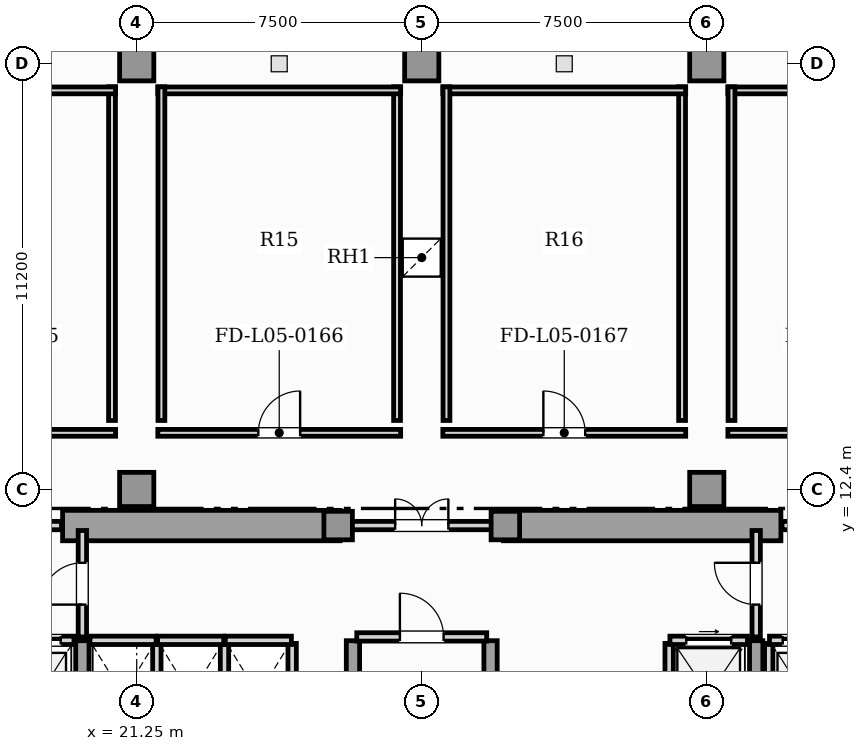
"""IFC4 building model, lengths in metres.
Left out: names, types, materials, properties, quantities, classifications, styles, units other than length and angle.
Written with IfcOpenShell. Run it as: python <this file> out.ifc"""

import sys

from ifc_helpers import new_model, si_unit, direction, frame, frame_2d, origin, origin_2d, place, context, subcontext, project, spatial, rectangle, extrude, element, fill, save


model = new_model("IFC4")
c1 = context("Model", 3, precision=1e-05, world=origin(), true_north=direction((0.0, 1.0)))
c2 = subcontext(c1, "Body", "Model", "MODEL_VIEW")
j1 = project(units=[si_unit("LENGTHUNIT", "METRE"), si_unit("PLANEANGLEUNIT", "RADIAN")], contexts=[c1])
p1 = place(None, origin())
s1 = spatial("IfcSite", under=j1, at=p1, CompositionType="ELEMENT")
p2 = place(p1, origin())
s2 = spatial("IfcBuilding", under=s1, at=p2, CompositionType="ELEMENT")
p3 = place(p2, frame((0.0, 0.0, 24.6)))
s3 = spatial("IfcBuildingStorey", under=s2, at=p3, CompositionType="ELEMENT", Elevation=24.6)
for number, where, z_axis, x_axis in (
    (1, (19.3, 11.45, 0.0), (0.0, 0.0, 1.0), (1.0, 0.0, 0.0)),
    (2, (30.9, 11.45, 0.0), (0.0, 0.0, 1.0), (1.0, 0.0, 0.0)),
):
    element("IfcWall", number, at=place(p3, frame(where, z_axis=z_axis, x_axis=x_axis)), inside=s3, PredefinedType="SHEAR", context=c2, shape_type="SweptSolid", body=[
        extrude(rectangle(XDim=7.3, YDim=0.8, at=frame_2d((3.65, 0.0))), origin(), (0.0, 0.0, 1.0), 4.95),
    ])
for number, where, z_axis, x_axis in (
    (3, (19.82, 0.92, 0.0), (0.0, 0.0, 1.0), (0.0, 1.0, 0.0)),
    (4, (26.94, 0.92, 0.0), (0.0, 0.0, 1.0), (0.0, 1.0, 0.0)),
    (5, (30.56, 0.92, 0.0), (0.0, 0.0, 1.0), (0.0, 1.0, 0.0)),
    (6, (37.55, 0.92, 0.0), (0.0, 0.0, 1.0), (0.0, 1.0, 0.0)),
):
    element("IfcWall", number, at=place(p3, frame(where, z_axis=z_axis, x_axis=x_axis)), inside=s3, PredefinedType="SHEAR", context=c2, shape_type="SweptSolid", body=[
        extrude(rectangle(XDim=7.5, YDim=0.35, at=frame_2d((3.75, 0.0))), origin(), (0.0, 0.0, 1.0), 4.95),
    ])
for number, where, z_axis, x_axis in (
    (7, (26.55, 11.45, 0.0), (0.0, 0.0, 1.0), (1.0, 0.0, 0.0)),
    (8, (30.95, 11.45, 0.0), (0.0, 0.0, 1.0), (1.0, 0.0, 0.0)),
):
    element("IfcColumn", number, at=place(p3, frame(where, z_axis=z_axis, x_axis=x_axis)), inside=s3, PredefinedType="COLUMN", context=c2, shape_type="SweptSolid", body=[
        extrude(rectangle(XDim=0.75, YDim=0.75, at=origin_2d()), origin(), (0.0, 0.0, 1.0), 5.2),
    ])
for number, where, z_axis, x_axis in (
    (9, (28.75, 23.6, 0.0), (0.0, 0.0, 1.0), (1.0, 0.0, 0.0)),
    (10, (21.25, 12.4, 0.0), (0.0, 0.0, 1.0), (1.0, 0.0, 0.0)),
    (11, (36.25, 12.4, 0.0), (0.0, 0.0, 1.0), (1.0, 0.0, 0.0)),
    (12, (21.25, 23.6, 0.0), (0.0, 0.0, 1.0), (1.0, 0.0, 0.0)),
    (13, (36.25, 23.6, 0.0), (0.0, 0.0, 1.0), (1.0, 0.0, 0.0)),
):
    element("IfcColumn", number, at=place(p3, frame(where, z_axis=z_axis, x_axis=x_axis)), inside=s3, PredefinedType="COLUMN", context=c2, shape_type="SweptSolid", body=[
        extrude(rectangle(XDim=0.9, YDim=0.9, at=origin_2d()), origin(), (0.0, 0.0, 1.0), 5.2),
    ])
p4 = place(p3, frame((17.78, 8.43, 0.0), z_axis=(0.0, 0.0, 1.0), x_axis=(1.0, 0.0, 0.0)))
e14 = element("IfcWall", 14, at=p4, inside=s3, PredefinedType="SOLIDWALL", context=c2, shape_type="SweptSolid", body=[
    extrude(rectangle(XDim=1.82, YDim=0.22, at=frame_2d((0.91, 0.0))), origin(), (0.0, 0.0, 1.0), 4.95),
])
p5 = place(p4, frame((0.35, 0.0, 0.0)))
e15 = element("IfcOpeningElement", 15, at=p5, cuts=e14, PredefinedType="OPENING", context=c2, shape_type="SweptSolid", body=[
    extrude(rectangle(XDim=1.12, YDim=2.25, at=frame_2d((0.56, 1.125))), frame((0.0, 0.12, 0.0), z_axis=(0.0, -1.0, 0.0), x_axis=(1.0, 0.0, 0.0)), (0.0, 0.0, 1.0), 0.24),
])
p6 = place(p3, frame((37.88, 5.65, 0.0), z_axis=(0.0, 0.0, 1.0), x_axis=(0.0, 1.0, 0.0)))
e16 = element("IfcWall", 16, at=p6, inside=s3, PredefinedType="SOLIDWALL", context=c2, shape_type="SweptSolid", body=[
    extrude(rectangle(XDim=2.7, YDim=0.22, at=frame_2d((1.35, 0.0))), origin(), (0.0, 0.0, 1.0), 4.95),
])
p7 = place(p3, frame((37.9, 8.43, 0.0), z_axis=(0.0, 0.0, 1.0), x_axis=(1.0, 0.0, 0.0)))
e17 = element("IfcWall", 17, at=p7, inside=s3, PredefinedType="SOLIDWALL", context=c2, shape_type="SweptSolid", body=[
    extrude(rectangle(XDim=1.82, YDim=0.22, at=frame_2d((0.91, 0.0))), origin(), (0.0, 0.0, 1.0), 4.95),
])
p8 = place(p7, frame((0.35, 0.0, 0.0)))
e18 = element("IfcOpeningElement", 18, at=p8, cuts=e17, PredefinedType="OPENING", context=c2, shape_type="SweptSolid", body=[
    extrude(rectangle(XDim=1.12, YDim=2.25, at=frame_2d((0.56, 1.125))), frame((0.0, 0.12, 0.0), z_axis=(0.0, -1.0, 0.0), x_axis=(1.0, 0.0, 0.0)), (0.0, 0.0, 1.0), 0.24),
])
p9 = place(p3, frame((35.26, 5.65, 0.0), z_axis=(0.0, 0.0, 1.0), x_axis=(0.0, 1.0, 0.0)))
e19 = element("IfcWall", 19, at=p9, inside=s3, PredefinedType="SOLIDWALL", context=c2, shape_type="SweptSolid", body=[
    extrude(rectangle(XDim=2.7, YDim=0.22, at=frame_2d((1.35, 0.0))), origin(), (0.0, 0.0, 1.0), 4.95),
])
p10 = place(p3, frame((35.28, 8.43, 0.0), z_axis=(0.0, 0.0, 1.0), x_axis=(1.0, 0.0, 0.0)))
e20 = element("IfcWall", 20, at=p10, inside=s3, PredefinedType="SOLIDWALL", context=c2, shape_type="SweptSolid", body=[
    extrude(rectangle(XDim=2.04, YDim=0.22, at=frame_2d((1.02, 0.0))), origin(), (0.0, 0.0, 1.0), 4.95),
])
p11 = place(p10, frame((0.43, 0.0, 0.0)))
e21 = element("IfcOpeningElement", 21, at=p11, cuts=e20, PredefinedType="OPENING", context=c2, shape_type="SweptSolid", body=[
    extrude(rectangle(XDim=1.18, YDim=2.2, at=frame_2d((0.59, 1.1))), frame((0.0, 0.12, 0.0), z_axis=(0.0, -1.0, 0.0), x_axis=(1.0, 0.0, 0.0)), (0.0, 0.0, 1.0), 0.24),
])
p12 = place(p3, frame((21.78, 5.65, 0.0), z_axis=(0.0, 0.0, 1.0), x_axis=(0.0, 1.0, 0.0)))
e22 = element("IfcWall", 22, at=p12, inside=s3, PredefinedType="SOLIDWALL", context=c2, shape_type="SweptSolid", body=[
    extrude(rectangle(XDim=2.7, YDim=0.22, at=frame_2d((1.35, 0.0))), origin(), (0.0, 0.0, 1.0), 4.95),
])
p13 = place(p3, frame((20.02, 8.43, 0.0), z_axis=(0.0, 0.0, 1.0), x_axis=(1.0, 0.0, 0.0)))
e23 = element("IfcWall", 23, at=p13, inside=s3, PredefinedType="SOLIDWALL", context=c2, shape_type="SweptSolid", body=[
    extrude(rectangle(XDim=1.74, YDim=0.22, at=frame_2d((0.87, 0.0))), origin(), (0.0, 0.0, 1.0), 4.95),
])
p14 = place(p3, frame((23.56, 5.65, 0.0), z_axis=(0.0, 0.0, 1.0), x_axis=(0.0, 1.0, 0.0)))
e24 = element("IfcWall", 24, at=p14, inside=s3, PredefinedType="SOLIDWALL", context=c2, shape_type="SweptSolid", body=[
    extrude(rectangle(XDim=2.7, YDim=0.22, at=frame_2d((1.35, 0.0))), origin(), (0.0, 0.0, 1.0), 4.95),
])
p15 = place(p3, frame((21.8, 8.43, 0.0), z_axis=(0.0, 0.0, 1.0), x_axis=(1.0, 0.0, 0.0)))
e25 = element("IfcWall", 25, at=p15, inside=s3, PredefinedType="SOLIDWALL", context=c2, shape_type="SweptSolid", body=[
    extrude(rectangle(XDim=1.74, YDim=0.22, at=frame_2d((0.87, 0.0))), origin(), (0.0, 0.0, 1.0), 4.95),
])
p16 = place(p3, frame((25.34, 5.65, 0.0), z_axis=(0.0, 0.0, 1.0), x_axis=(0.0, 1.0, 0.0)))
e26 = element("IfcWall", 26, at=p16, inside=s3, PredefinedType="SOLIDWALL", context=c2, shape_type="SweptSolid", body=[
    extrude(rectangle(XDim=2.7, YDim=0.22, at=frame_2d((1.35, 0.0))), origin(), (0.0, 0.0, 1.0), 4.95),
])
p17 = place(p3, frame((23.58, 8.43, 0.0), z_axis=(0.0, 0.0, 1.0), x_axis=(1.0, 0.0, 0.0)))
e27 = element("IfcWall", 27, at=p17, inside=s3, PredefinedType="SOLIDWALL", context=c2, shape_type="SweptSolid", body=[
    extrude(rectangle(XDim=1.74, YDim=0.22, at=frame_2d((0.87, 0.0))), origin(), (0.0, 0.0, 1.0), 4.95),
])
p18 = place(p3, frame((27.04, 8.52, 0.0), z_axis=(0.0, 0.0, 1.0), x_axis=(1.0, 0.0, 0.0)))
e28 = element("IfcWall", 28, at=p18, inside=s3, PredefinedType="SOLIDWALL", context=c2, shape_type="SweptSolid", body=[
    extrude(rectangle(XDim=3.42, YDim=0.22, at=frame_2d((1.71, 0.0))), origin(), (0.0, 0.0, 1.0), 4.95),
])
p19 = place(p18, frame((1.135, 0.0, 0.0)))
e29 = element("IfcOpeningElement", 29, at=p19, cuts=e28, PredefinedType="OPENING", context=c2, shape_type="SweptSolid", body=[
    extrude(rectangle(XDim=1.15, YDim=2.2, at=frame_2d((0.575, 1.1))), frame((0.0, 0.12, 0.0), z_axis=(0.0, -1.0, 0.0), x_axis=(1.0, 0.0, 0.0)), (0.0, 0.0, 1.0), 0.24),
])
p20 = place(p3, frame((19.82, 8.52, 0.0), z_axis=(0.0, 0.0, 1.0), x_axis=(0.0, 1.0, 0.0)))
e30 = element("IfcWall", 30, at=p20, inside=s3, PredefinedType="SOLIDWALL", context=c2, shape_type="SweptSolid", body=[
    extrude(rectangle(XDim=2.8, YDim=0.22, at=frame_2d((1.4, 0.0))), origin(), (0.0, 0.0, 1.0), 4.406),
])
p21 = place(p20, frame((0.85, 0.0, 0.0)))
e31 = element("IfcOpeningElement", 31, at=p21, cuts=e30, PredefinedType="OPENING", context=c2, shape_type="SweptSolid", body=[
    extrude(rectangle(XDim=1.1, YDim=2.2, at=frame_2d((0.55, 1.1))), frame((0.0, 0.12, 0.0), z_axis=(0.0, -1.0, 0.0), x_axis=(1.0, 0.0, 0.0)), (0.0, 0.0, 1.0), 0.24),
])
p22 = place(p3, frame((37.55, 8.52, 0.0), z_axis=(0.0, 0.0, 1.0), x_axis=(0.0, 1.0, 0.0)))
e32 = element("IfcWall", 32, at=p22, inside=s3, PredefinedType="SOLIDWALL", context=c2, shape_type="SweptSolid", body=[
    extrude(rectangle(XDim=2.8, YDim=0.22, at=frame_2d((1.4, 0.0))), origin(), (0.0, 0.0, 1.0), 4.406),
])
p23 = place(p22, frame((0.85, 0.0, 0.0)))
e33 = element("IfcOpeningElement", 33, at=p23, cuts=e32, PredefinedType="OPENING", context=c2, shape_type="SweptSolid", body=[
    extrude(rectangle(XDim=1.1, YDim=2.2, at=frame_2d((0.55, 1.1))), frame((0.0, 0.12, 0.0), z_axis=(0.0, -1.0, 0.0), x_axis=(1.0, 0.0, 0.0)), (0.0, 0.0, 1.0), 0.24),
])
p24 = place(p3, frame((16.23, 11.45, 0.0), z_axis=(0.0, 0.0, 1.0), x_axis=(1.0, 0.0, 0.0)))
e34 = element("IfcWall", 34, at=p24, inside=s3, PredefinedType="SOLIDWALL", context=c2, shape_type="SweptSolid", body=[
    extrude(rectangle(XDim=3.04, YDim=0.22, at=frame_2d((1.52, 0.0))), origin(), (0.0, 0.0, 1.0), 4.95),
])
p25 = place(p24, frame((0.97, 0.0, 0.0)))
e35 = element("IfcOpeningElement", 35, at=p25, cuts=e34, PredefinedType="OPENING", context=c2, shape_type="SweptSolid", body=[
    extrude(rectangle(XDim=1.1, YDim=2.2, at=frame_2d((0.55, 1.1))), frame((0.0, 0.12, 0.0), z_axis=(0.0, -1.0, 0.0), x_axis=(1.0, 0.0, 0.0)), (0.0, 0.0, 1.0), 0.24),
])
p26 = place(p3, frame((26.63, 11.45, 0.0), z_axis=(0.0, 0.0, 1.0), x_axis=(1.0, 0.0, 0.0)))
e36 = element("IfcWall", 36, at=p26, inside=s3, PredefinedType="SOLIDWALL", context=c2, shape_type="SweptSolid", body=[
    extrude(rectangle(XDim=4.24, YDim=0.22, at=frame_2d((2.12, 0.0))), origin(), (0.0, 0.0, 1.0), 4.95),
])
p27 = place(p26, frame((1.42, 0.0, 0.0)))
e37 = element("IfcOpeningElement", 37, at=p27, cuts=e36, PredefinedType="OPENING", context=c2, shape_type="SweptSolid", body=[
    extrude(rectangle(XDim=1.4, YDim=2.2, at=frame_2d((0.7, 1.1))), frame((0.0, 0.12, 0.0), z_axis=(0.0, -1.0, 0.0), x_axis=(1.0, 0.0, 0.0)), (0.0, 0.0, 1.0), 0.24),
])
p28 = place(p3, frame((38.23, 11.45, 0.0), z_axis=(0.0, 0.0, 1.0), x_axis=(1.0, 0.0, 0.0)))
e38 = element("IfcWall", 38, at=p28, inside=s3, PredefinedType="SOLIDWALL", context=c2, shape_type="SweptSolid", body=[
    extrude(rectangle(XDim=3.04, YDim=0.22, at=frame_2d((1.52, 0.0))), origin(), (0.0, 0.0, 1.0), 4.95),
])
p29 = place(p28, frame((0.97, 0.0, 0.0)))
e39 = element("IfcOpeningElement", 39, at=p29, cuts=e38, PredefinedType="OPENING", context=c2, shape_type="SweptSolid", body=[
    extrude(rectangle(XDim=1.1, YDim=2.2, at=frame_2d((0.55, 1.1))), frame((0.0, 0.12, 0.0), z_axis=(0.0, -1.0, 0.0), x_axis=(1.0, 0.0, 0.0)), (0.0, 0.0, 1.0), 0.24),
])
p30 = place(p3, frame((14.305, 13.89, 0.0), z_axis=(0.0, 0.0, 1.0), x_axis=(1.0, 0.0, 0.0)))
e40 = element("IfcWall", 40, at=p30, inside=s3, PredefinedType="PARTITIONING", context=c2, shape_type="SweptSolid", body=[
    extrude(rectangle(XDim=6.39, YDim=0.18, at=frame_2d((3.195, 0.0))), origin(), (0.0, 0.0, 1.0), 4.95),
])
p31 = place(p30, frame((2.645, 0.0, 0.0)))
e41 = element("IfcOpeningElement", 41, at=p31, cuts=e40, PredefinedType="OPENING", context=c2, shape_type="SweptSolid", body=[
    extrude(rectangle(XDim=1.1, YDim=2.2, at=frame_2d((0.55, 1.1))), frame((0.0, 0.1, 0.0), z_axis=(0.0, -1.0, 0.0), x_axis=(1.0, 0.0, 0.0)), (0.0, 0.0, 1.0), 0.2),
])
p32 = place(p3, frame((21.805, 13.89, 0.0), z_axis=(0.0, 0.0, 1.0), x_axis=(1.0, 0.0, 0.0)))
e42 = element("IfcWall", 42, at=p32, inside=s3, PredefinedType="PARTITIONING", context=c2, shape_type="SweptSolid", body=[
    extrude(rectangle(XDim=6.39, YDim=0.18, at=frame_2d((3.195, 0.0))), origin(), (0.0, 0.0, 1.0), 4.95),
])
p33 = place(p32, frame((2.645, 0.0, 0.0)))
e43 = element("IfcOpeningElement", 43, at=p33, cuts=e42, PredefinedType="OPENING", context=c2, shape_type="SweptSolid", body=[
    extrude(rectangle(XDim=1.1, YDim=2.2, at=frame_2d((0.55, 1.1))), frame((0.0, 0.1, 0.0), z_axis=(0.0, -1.0, 0.0), x_axis=(1.0, 0.0, 0.0)), (0.0, 0.0, 1.0), 0.2),
])
p34 = place(p3, frame((29.305, 13.89, 0.0), z_axis=(0.0, 0.0, 1.0), x_axis=(1.0, 0.0, 0.0)))
e44 = element("IfcWall", 44, at=p34, inside=s3, PredefinedType="PARTITIONING", context=c2, shape_type="SweptSolid", body=[
    extrude(rectangle(XDim=6.39, YDim=0.18, at=frame_2d((3.195, 0.0))), origin(), (0.0, 0.0, 1.0), 4.95),
])
p35 = place(p34, frame((2.645, 0.0, 0.0)))
e45 = element("IfcOpeningElement", 45, at=p35, cuts=e44, PredefinedType="OPENING", context=c2, shape_type="SweptSolid", body=[
    extrude(rectangle(XDim=1.1, YDim=2.2, at=frame_2d((0.55, 1.1))), frame((0.0, 0.1, 0.0), z_axis=(0.0, -1.0, 0.0), x_axis=(1.0, 0.0, 0.0)), (0.0, 0.0, 1.0), 0.2),
])
p36 = place(p3, frame((36.805, 13.89, 0.0), z_axis=(0.0, 0.0, 1.0), x_axis=(1.0, 0.0, 0.0)))
e46 = element("IfcWall", 46, at=p36, inside=s3, PredefinedType="PARTITIONING", context=c2, shape_type="SweptSolid", body=[
    extrude(rectangle(XDim=6.39, YDim=0.18, at=frame_2d((3.195, 0.0))), origin(), (0.0, 0.0, 1.0), 4.95),
])
p37 = place(p36, frame((2.645, 0.0, 0.0)))
e47 = element("IfcOpeningElement", 47, at=p37, cuts=e46, PredefinedType="OPENING", context=c2, shape_type="SweptSolid", body=[
    extrude(rectangle(XDim=1.1, YDim=2.2, at=frame_2d((0.55, 1.1))), frame((0.0, 0.1, 0.0), z_axis=(0.0, -1.0, 0.0), x_axis=(1.0, 0.0, 0.0)), (0.0, 0.0, 1.0), 0.2),
])
p38 = place(p3, frame((20.6, 14.215, 0.0), z_axis=(0.0, 0.0, 1.0), x_axis=(0.0, 1.0, 0.0)))
e48 = element("IfcWall", 48, at=p38, inside=s3, PredefinedType="PARTITIONING", context=c2, shape_type="SweptSolid", body=[
    extrude(rectangle(XDim=8.78, YDim=0.18, at=frame_2d((4.39, 0.0))), origin(), (0.0, 0.0, 1.0), 4.95),
])
p39 = place(p3, frame((20.695, 22.9, 0.0), z_axis=(0.0, 0.0, 1.0), x_axis=(-1.0, 0.0, 0.0)))
e49 = element("IfcWall", 49, at=p39, inside=s3, PredefinedType="PARTITIONING", context=c2, shape_type="SweptSolid", body=[
    extrude(rectangle(XDim=6.39, YDim=0.18, at=frame_2d((3.195, 0.0))), origin(), (0.0, 0.0, 1.0), 4.95),
])
p40 = place(p3, frame((28.1, 14.215, 0.0), z_axis=(0.0, 0.0, 1.0), x_axis=(0.0, 1.0, 0.0)))
e50 = element("IfcWall", 50, at=p40, inside=s3, PredefinedType="PARTITIONING", context=c2, shape_type="SweptSolid", body=[
    extrude(rectangle(XDim=8.78, YDim=0.18, at=frame_2d((4.39, 0.0))), origin(), (0.0, 0.0, 1.0), 4.95),
])
p41 = place(p3, frame((28.195, 22.9, 0.0), z_axis=(0.0, 0.0, 1.0), x_axis=(-1.0, 0.0, 0.0)))
e51 = element("IfcWall", 51, at=p41, inside=s3, PredefinedType="PARTITIONING", context=c2, shape_type="SweptSolid", body=[
    extrude(rectangle(XDim=6.39, YDim=0.18, at=frame_2d((3.195, 0.0))), origin(), (0.0, 0.0, 1.0), 4.95),
])
for number, where, z_axis, x_axis in (
    (52, (21.9, 22.995, 0.0), (0.0, 0.0, 1.0), (0.0, -1.0, 0.0)),
    (53, (35.6, 14.215, 0.0), (0.0, 0.0, 1.0), (0.0, 1.0, 0.0)),
):
    element("IfcWall", number, at=place(p3, frame(where, z_axis=z_axis, x_axis=x_axis)), inside=s3, PredefinedType="PARTITIONING", context=c2, shape_type="SweptSolid", body=[
        extrude(rectangle(XDim=8.78, YDim=0.18, at=frame_2d((4.39, 0.0))), origin(), (0.0, 0.0, 1.0), 4.95),
    ])
p42 = place(p3, frame((35.695, 22.9, 0.0), z_axis=(0.0, 0.0, 1.0), x_axis=(-1.0, 0.0, 0.0)))
e54 = element("IfcWall", 54, at=p42, inside=s3, PredefinedType="PARTITIONING", context=c2, shape_type="SweptSolid", body=[
    extrude(rectangle(XDim=6.39, YDim=0.18, at=frame_2d((3.195, 0.0))), origin(), (0.0, 0.0, 1.0), 4.95),
])
p43 = place(p3, frame((29.4, 22.995, 0.0), z_axis=(0.0, 0.0, 1.0), x_axis=(0.0, -1.0, 0.0)))
e55 = element("IfcWall", 55, at=p43, inside=s3, PredefinedType="PARTITIONING", context=c2, shape_type="SweptSolid", body=[
    extrude(rectangle(XDim=8.78, YDim=0.18, at=frame_2d((4.39, 0.0))), origin(), (0.0, 0.0, 1.0), 4.95),
])
p44 = place(p3, frame((43.195, 22.9, 0.0), z_axis=(0.0, 0.0, 1.0), x_axis=(-1.0, 0.0, 0.0)))
e56 = element("IfcWall", 56, at=p44, inside=s3, PredefinedType="PARTITIONING", context=c2, shape_type="SweptSolid", body=[
    extrude(rectangle(XDim=6.39, YDim=0.18, at=frame_2d((3.195, 0.0))), origin(), (0.0, 0.0, 1.0), 4.95),
])
p45 = place(p3, frame((36.9, 22.995, 0.0), z_axis=(0.0, 0.0, 1.0), x_axis=(0.0, -1.0, 0.0)))
e57 = element("IfcWall", 57, at=p45, inside=s3, PredefinedType="PARTITIONING", context=c2, shape_type="SweptSolid", body=[
    extrude(rectangle(XDim=8.78, YDim=0.18, at=frame_2d((4.39, 0.0))), origin(), (0.0, 0.0, 1.0), 4.95),
])
p46 = place(p3, frame((0.0, 0.0, -0.4)))
p47 = place(p46, frame((28.75, 18.5, 0.35)))
e58 = element("IfcDoor", 58, at=p47, inside=s3, OperationType="SINGLE_SWING_LEFT", PredefinedType="TRAPDOOR", context=c2, shape_type="SweptSolid", body=[
    extrude(rectangle(XDim=1.0, YDim=1.0, at=origin_2d()), origin(), (0.0, 0.0, 1.0), 0.05),
])
p48 = place(p5, origin())
e59 = element("IfcDoor", 59, at=p48, inside=s3, OperationType="SLIDING_TO_RIGHT", PredefinedType="DOOR", context=c2, shape_type="SweptSolid", body=[
    extrude(rectangle(XDim=1.12, YDim=2.25, at=frame_2d((0.56, 1.125))), frame((0.0, 0.025, 0.0), z_axis=(0.0, -1.0, 0.0), x_axis=(1.0, 0.0, 0.0)), (0.0, 0.0, 1.0), 0.05),
])
fill(e15, e59)
p49 = place(p8, origin())
e60 = element("IfcDoor", 60, at=p49, inside=s3, OperationType="SLIDING_TO_LEFT", PredefinedType="DOOR", context=c2, shape_type="SweptSolid", body=[
    extrude(rectangle(XDim=1.12, YDim=2.25, at=frame_2d((0.56, 1.125))), frame((0.0, 0.025, 0.0), z_axis=(0.0, -1.0, 0.0), x_axis=(1.0, 0.0, 0.0)), (0.0, 0.0, 1.0), 0.05),
])
fill(e18, e60)
p50 = place(p11, origin())
e61 = element("IfcDoor", 61, at=p50, inside=s3, OperationType="SLIDING_TO_RIGHT", PredefinedType="DOOR", context=c2, shape_type="SweptSolid", body=[
    extrude(rectangle(XDim=1.18, YDim=2.2, at=frame_2d((0.59, 1.1))), frame((0.0, 0.025, 0.0), z_axis=(0.0, -1.0, 0.0), x_axis=(1.0, 0.0, 0.0)), (0.0, 0.0, 1.0), 0.05),
])
fill(e21, e61)
p51 = place(p19, origin())
e62 = element("IfcDoor", 62, at=p51, inside=s3, OperationType="SINGLE_SWING_LEFT", PredefinedType="DOOR", context=c2, shape_type="SweptSolid", body=[
    extrude(rectangle(XDim=1.15, YDim=2.2, at=frame_2d((0.575, 1.1))), frame((0.0, 0.025, 0.0), z_axis=(0.0, -1.0, 0.0), x_axis=(1.0, 0.0, 0.0)), (0.0, 0.0, 1.0), 0.05),
])
fill(e29, e62)
p52 = place(p21, origin())
e63 = element("IfcDoor", 63, at=p52, inside=s3, OperationType="SINGLE_SWING_LEFT", PredefinedType="DOOR", context=c2, shape_type="SweptSolid", body=[
    extrude(rectangle(XDim=1.1, YDim=2.2, at=frame_2d((0.55, 1.1))), frame((0.0, 0.025, 0.0), z_axis=(0.0, -1.0, 0.0), x_axis=(1.0, 0.0, 0.0)), (0.0, 0.0, 1.0), 0.05),
])
fill(e31, e63)
p53 = place(p23, origin())
e64 = element("IfcDoor", 64, at=p53, inside=s3, OperationType="SINGLE_SWING_RIGHT", PredefinedType="DOOR", context=c2, shape_type="SweptSolid", body=[
    extrude(rectangle(XDim=1.1, YDim=2.2, at=frame_2d((0.55, 1.1))), frame((0.0, 0.025, 0.0), z_axis=(0.0, -1.0, 0.0), x_axis=(1.0, 0.0, 0.0)), (0.0, 0.0, 1.0), 0.05),
])
fill(e33, e64)
p54 = place(p27, origin())
e65 = element("IfcDoor", 65, at=p54, inside=s3, OperationType="DOUBLE_DOOR_SINGLE_SWING", PredefinedType="DOOR", context=c2, shape_type="SweptSolid", body=[
    extrude(rectangle(XDim=1.4, YDim=2.2, at=frame_2d((0.7, 1.1))), frame((0.0, 0.025, 0.0), z_axis=(0.0, -1.0, 0.0), x_axis=(1.0, 0.0, 0.0)), (0.0, 0.0, 1.0), 0.05),
])
fill(e37, e65)
p55 = place(p33, origin())
e66 = element("IfcDoor", 66, at=p55, inside=s3, OperationType="SINGLE_SWING_RIGHT", PredefinedType="DOOR", context=c2, shape_type="SweptSolid", body=[
    extrude(rectangle(XDim=1.1, YDim=2.2, at=frame_2d((0.55, 1.1))), frame((0.0, 0.025, 0.0), z_axis=(0.0, -1.0, 0.0), x_axis=(1.0, 0.0, 0.0)), (0.0, 0.0, 1.0), 0.05),
])
fill(e43, e66)
p56 = place(p35, origin())
e67 = element("IfcDoor", 67, at=p56, inside=s3, OperationType="SINGLE_SWING_LEFT", PredefinedType="DOOR", context=c2, shape_type="SweptSolid", body=[
    extrude(rectangle(XDim=1.1, YDim=2.2, at=frame_2d((0.55, 1.1))), frame((0.0, 0.025, 0.0), z_axis=(0.0, -1.0, 0.0), x_axis=(1.0, 0.0, 0.0)), (0.0, 0.0, 1.0), 0.05),
])
fill(e45, e67)
save(model, sys.argv[1])
